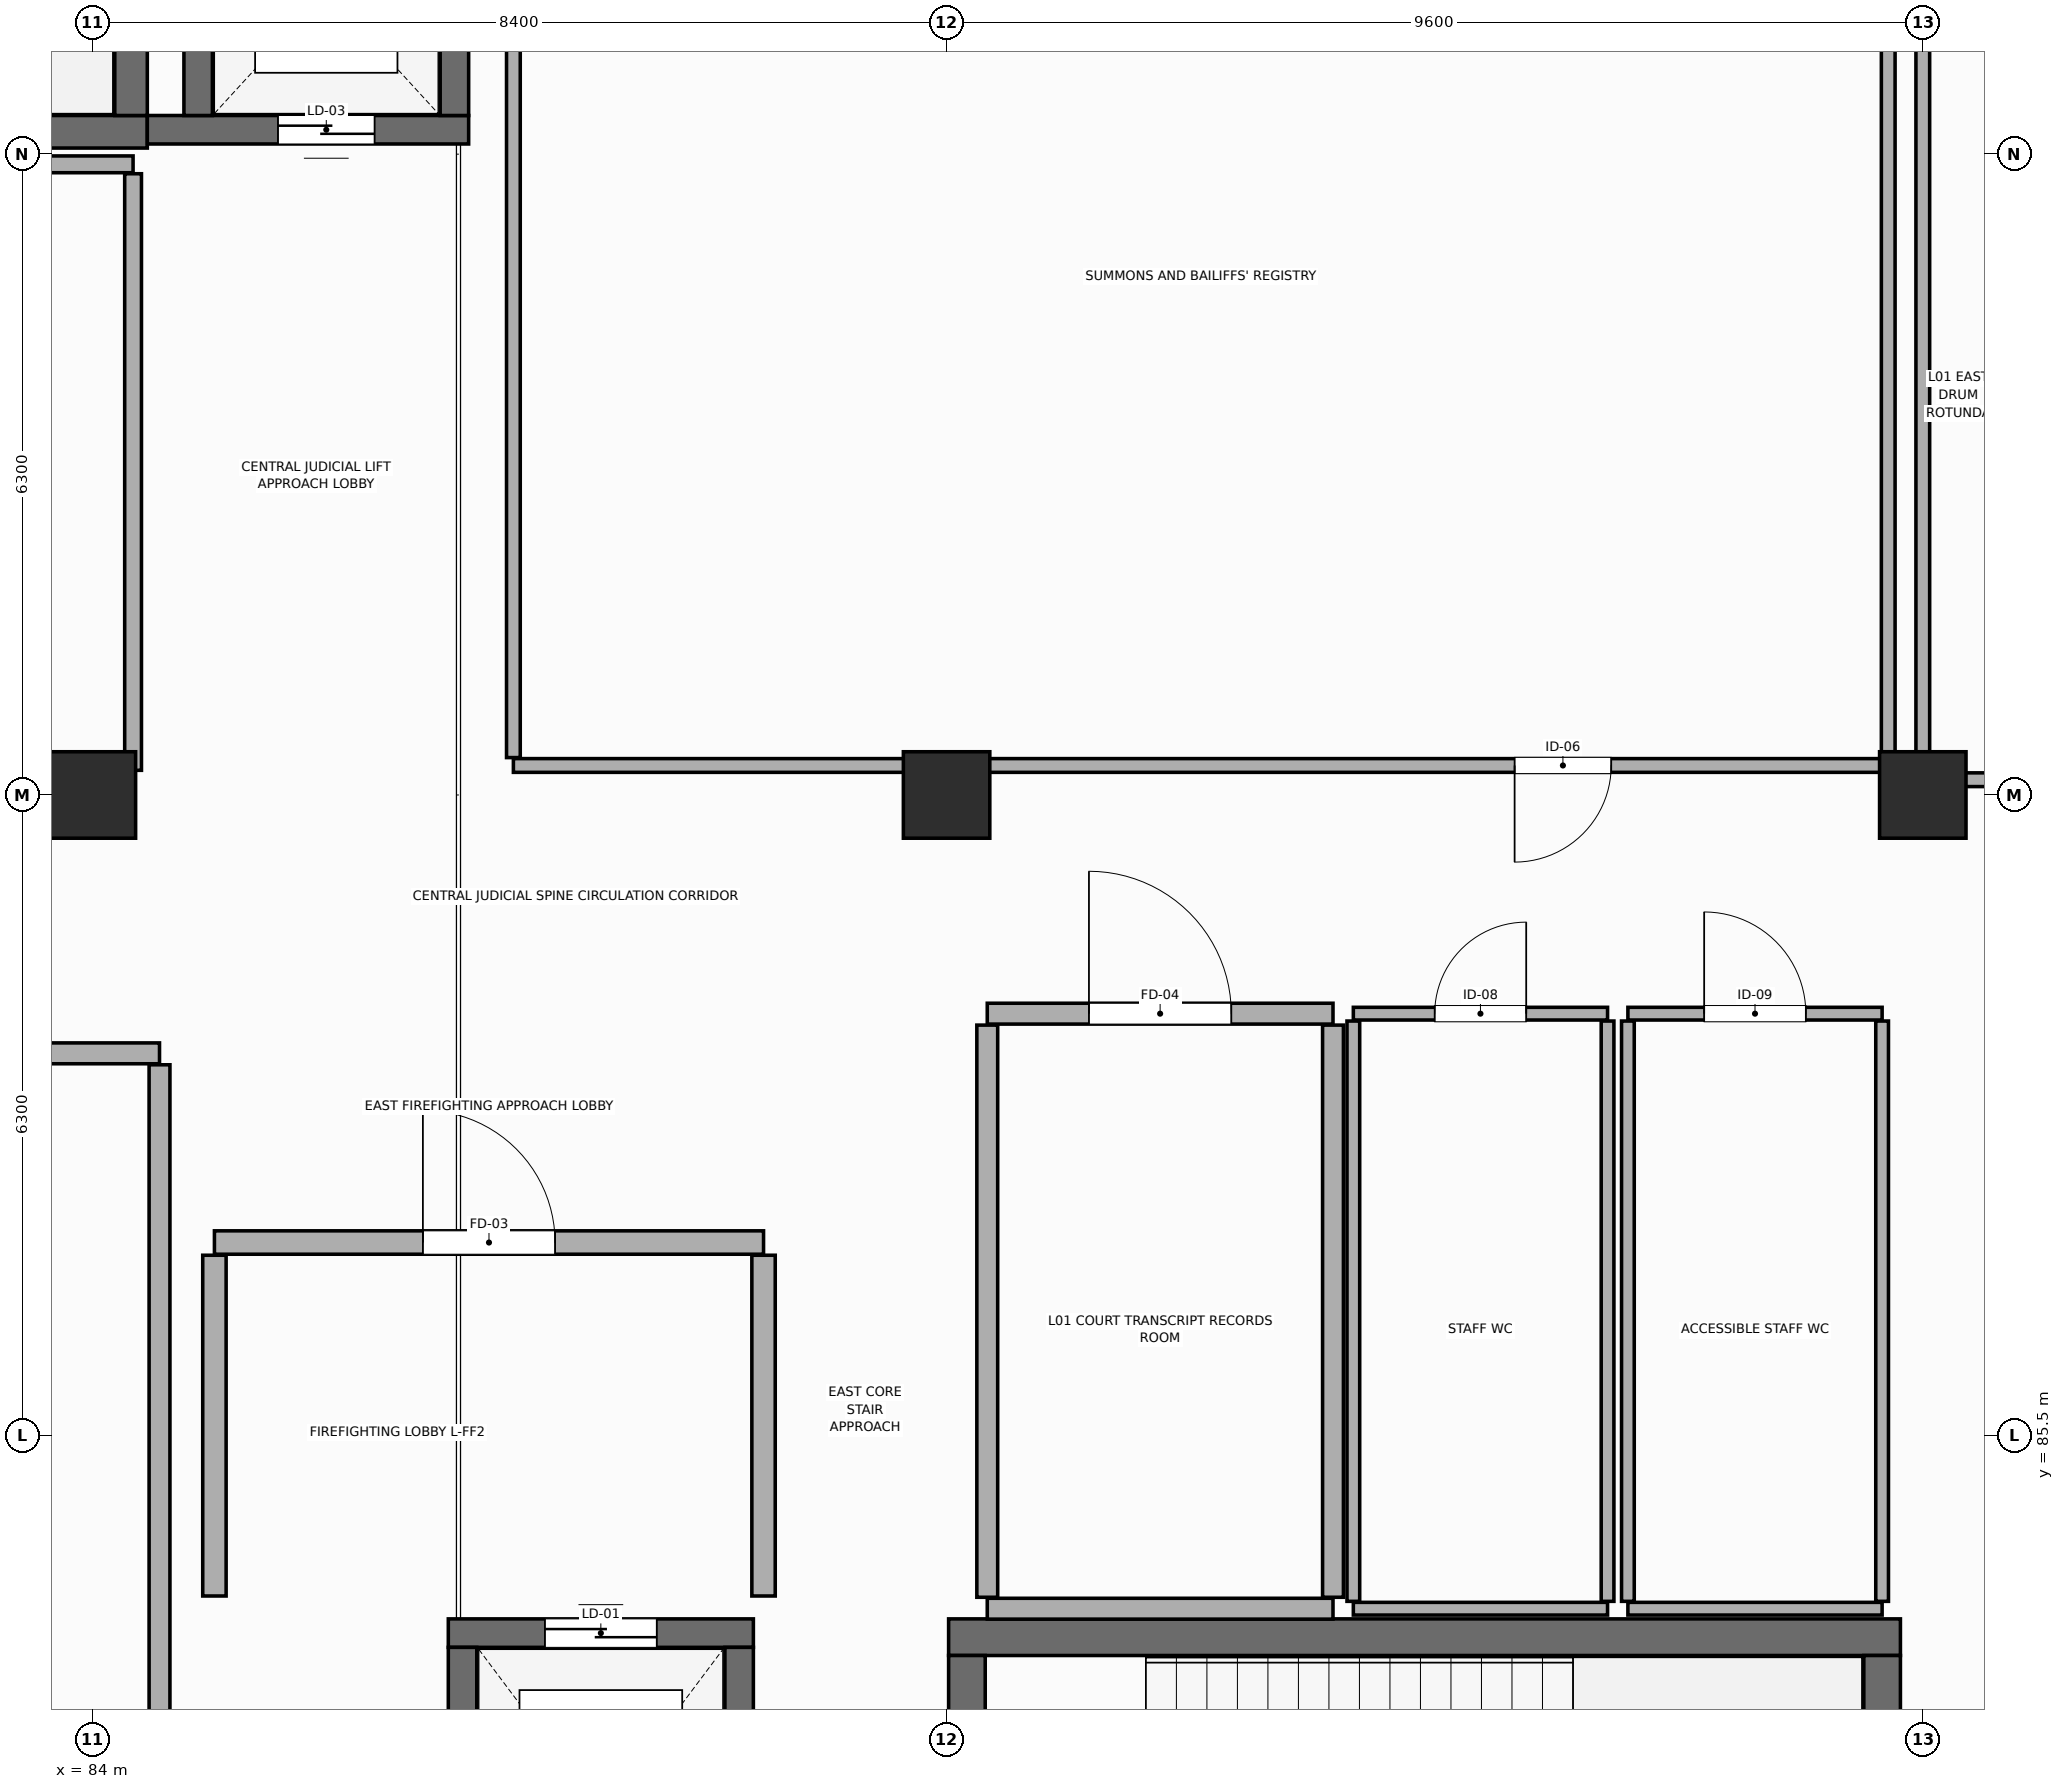
"""IFC4 building model, lengths in metres.
Left out: names, types, materials, properties, quantities, classifications, styles, units other than length and angle.
Written with IfcOpenShell. Run it as: python <this file> out.ifc"""

import sys

from ifc_helpers import new_model, si_unit, direction, frame, frame_2d, origin, origin_2d, place, context, subcontext, project, spatial, rectangle, extrude, element, fill, save


model = new_model("IFC4")
c1 = context("Model", 3, precision=1e-05, world=origin(), true_north=direction((0.0, 1.0)))
c2 = subcontext(c1, "Body", "Model", "MODEL_VIEW")
j1 = project(units=[si_unit("LENGTHUNIT", "METRE"), si_unit("PLANEANGLEUNIT", "RADIAN")], contexts=[c1])
p1 = place(None, origin())
s1 = spatial("IfcSite", under=j1, at=p1, CompositionType="ELEMENT")
p2 = place(p1, origin())
s2 = spatial("IfcBuilding", under=s1, at=p2, CompositionType="ELEMENT")
p3 = place(p2, frame((0.0, 0.0, -4.8)))
s3 = spatial("IfcBuildingStorey", under=s2, at=p3, CompositionType="ELEMENT", Elevation=-4.8)
for number, where, z_axis, x_axis in (
    (1, (84.0, 91.8, -0.42), (0.0, 0.0, 1.0), (1.0, 0.0, 0.0)),
    (2, (92.4, 91.8, -0.42), (0.0, 0.0, 1.0), (1.0, 0.0, 0.0)),
    (3, (102.0, 91.8, -0.42), (0.0, 0.0, 1.0), (1.0, 0.0, 0.0)),
):
    element("IfcColumn", number, at=place(p3, frame(where, z_axis=z_axis, x_axis=x_axis)), inside=s3, PredefinedType="COLUMN", context=c2, shape_type="SweptSolid", body=[
        extrude(rectangle(XDim=0.9, YDim=0.9, at=origin_2d()), origin(), (0.0, 0.0, 1.0), 5.22),
    ])
p4 = place(p3, frame((92.42, 83.52, -0.42), z_axis=(0.0, 0.0, 1.0), x_axis=(1.0, 0.0, 0.0)))
e4 = element("IfcWall", 4, at=p4, inside=s3, PredefinedType="SHEAR", context=c2, shape_type="SweptSolid", body=[
    extrude(rectangle(XDim=9.36, YDim=0.36, at=frame_2d((4.68, 0.0))), origin(), (0.0, 0.0, 1.0), 4.94),
])
p5 = place(p3, frame((92.6, 79.98, -0.42), z_axis=(0.0, 0.0, 1.0), x_axis=(0.0, 1.0, 0.0)))
e5 = element("IfcWall", 5, at=p5, inside=s3, PredefinedType="SHEAR", context=c2, shape_type="SweptSolid", body=[
    extrude(rectangle(XDim=3.36, YDim=0.36, at=frame_2d((1.68, 0.0))), origin(), (0.0, 0.0, 1.0), 4.94),
])
p6 = place(p5, frame((1.08, 0.0, 0.42)))
e6 = element("IfcOpeningElement", 6, at=p6, cuts=e5, PredefinedType="OPENING", context=c2, shape_type="SweptSolid", body=[
    extrude(rectangle(XDim=1.2, YDim=2.2, at=frame_2d((0.6, 1.1))), frame((0.0, 0.19, 0.0), z_axis=(0.0, -1.0, 0.0), x_axis=(1.0, 0.0, 0.0)), (0.0, 0.0, 1.0), 0.38),
])
p7 = place(p3, frame((101.6, 83.34, -0.42), z_axis=(0.0, 0.0, 1.0), x_axis=(0.0, -1.0, 0.0)))
e7 = element("IfcWall", 7, at=p7, inside=s3, PredefinedType="SHEAR", context=c2, shape_type="SweptSolid", body=[
    extrude(rectangle(XDim=3.36, YDim=0.36, at=frame_2d((1.68, 0.0))), origin(), (0.0, 0.0, 1.0), 4.94),
])
p8 = place(p3, frame((84.54, 98.32, -0.42), z_axis=(0.0, 0.0, 1.0), x_axis=(-1.0, 0.0, 0.0)))
e8 = element("IfcWall", 8, at=p8, inside=s3, PredefinedType="SHEAR", context=c2, shape_type="SweptSolid", body=[
    extrude(rectangle(XDim=9.08, YDim=0.32, at=frame_2d((4.54, 0.0))), origin(), (0.0, 0.0, 1.0), 4.94),
])
p9 = place(p3, frame((84.38, 101.76, -0.42), z_axis=(0.0, 0.0, 1.0), x_axis=(0.0, -1.0, 0.0)))
e9 = element("IfcWall", 9, at=p9, inside=s3, PredefinedType="SHEAR", context=c2, shape_type="SweptSolid", body=[
    extrude(rectangle(XDim=3.28, YDim=0.32, at=frame_2d((1.64, 0.0))), origin(), (0.0, 0.0, 1.0), 4.94),
])
p10 = place(p3, frame((87.5, 83.56, -0.42), z_axis=(0.0, 0.0, 1.0), x_axis=(1.0, 0.0, 0.0)))
e10 = element("IfcWall", 10, at=p10, inside=s3, PredefinedType="SHEAR", context=c2, shape_type="SweptSolid", body=[
    extrude(rectangle(XDim=3.0, YDim=0.28, at=frame_2d((1.5, 0.0))), origin(), (0.0, 0.0, 1.0), 4.94),
])
p11 = place(p10, frame((0.95, 0.0, 0.42)))
e11 = element("IfcOpeningElement", 11, at=p11, cuts=e10, PredefinedType="OPENING", context=c2, shape_type="SweptSolid", body=[
    extrude(rectangle(XDim=1.1, YDim=2.2, at=frame_2d((0.55, 1.1))), frame((0.0, 0.15, 0.0), z_axis=(0.0, -1.0, 0.0), x_axis=(1.0, 0.0, 0.0)), (0.0, 0.0, 1.0), 0.3),
])
for number, where, z_axis, x_axis in (
    (12, (87.64, 80.18, -0.42), (0.0, 0.0, 1.0), (0.0, 1.0, 0.0)),
    (13, (90.36, 83.42, -0.42), (0.0, 0.0, 1.0), (0.0, -1.0, 0.0)),
):
    element("IfcWall", number, at=place(p3, frame(where, z_axis=z_axis, x_axis=x_axis)), inside=s3, PredefinedType="SHEAR", context=c2, shape_type="SweptSolid", body=[
        extrude(rectangle(XDim=3.24, YDim=0.28, at=frame_2d((1.62, 0.0))), origin(), (0.0, 0.0, 1.0), 4.94),
    ])
p12 = place(p3, frame((87.7, 98.34, -0.42), z_axis=(0.0, 0.0, 1.0), x_axis=(-1.0, 0.0, 0.0)))
e14 = element("IfcWall", 14, at=p12, inside=s3, PredefinedType="SHEAR", context=c2, shape_type="SweptSolid", body=[
    extrude(rectangle(XDim=3.16, YDim=0.28, at=frame_2d((1.58, 0.0))), origin(), (0.0, 0.0, 1.0), 4.94),
])
p13 = place(p12, frame((0.925, 0.0, 0.42)))
e15 = element("IfcOpeningElement", 15, at=p13, cuts=e14, PredefinedType="OPENING", context=c2, shape_type="SweptSolid", body=[
    extrude(rectangle(XDim=0.95, YDim=2.15, at=frame_2d((0.475, 1.075))), frame((0.0, 0.15, 0.0), z_axis=(0.0, -1.0, 0.0), x_axis=(1.0, 0.0, 0.0)), (0.0, 0.0, 1.0), 0.3),
])
for number, where, z_axis, x_axis in (
    (16, (85.04, 98.48, -0.42), (0.0, 0.0, 1.0), (0.0, 1.0, 0.0)),
    (17, (87.56, 100.92, -0.42), (0.0, 0.0, 1.0), (0.0, -1.0, 0.0)),
):
    element("IfcWall", number, at=place(p3, frame(where, z_axis=z_axis, x_axis=x_axis)), inside=s3, PredefinedType="SHEAR", context=c2, shape_type="SweptSolid", body=[
        extrude(rectangle(XDim=2.44, YDim=0.28, at=frame_2d((1.22, 0.0))), origin(), (0.0, 0.0, 1.0), 4.94),
    ])
p14 = place(p3, frame((85.2, 87.4, 0.0), z_axis=(0.0, 0.0, 1.0), x_axis=(1.0, 0.0, 0.0)))
e18 = element("IfcWall", 18, at=p14, inside=s3, PredefinedType="STANDARD", context=c2, shape_type="SweptSolid", body=[
    extrude(rectangle(XDim=5.4, YDim=0.23, at=frame_2d((2.7, 0.0))), origin(), (0.0, 0.0, 1.0), 3.9),
])
p15 = place(p14, frame((2.05, 0.0, 0.0)))
e19 = element("IfcOpeningElement", 19, at=p15, cuts=e18, PredefinedType="OPENING", context=c2, shape_type="SweptSolid", body=[
    extrude(rectangle(XDim=1.3, YDim=2.2, at=frame_2d((0.65, 1.1))), frame((0.0, 0.125, 0.0), z_axis=(0.0, -1.0, 0.0), x_axis=(1.0, 0.0, 0.0)), (0.0, 0.0, 1.0), 0.25),
])
for number, where, z_axis, x_axis in (
    (20, (85.2, 83.925, 0.0), (0.0, 0.0, 1.0), (0.0, 1.0, 0.0)),
    (21, (90.6, 87.275, 0.0), (0.0, 0.0, 1.0), (0.0, -1.0, 0.0)),
):
    element("IfcWall", number, at=place(p3, frame(where, z_axis=z_axis, x_axis=x_axis)), inside=s3, PredefinedType="STANDARD", context=c2, shape_type="SweptSolid", body=[
        extrude(rectangle(XDim=3.35, YDim=0.23, at=frame_2d((1.675, 0.0))), origin(), (0.0, 0.0, 1.0), 3.9),
    ])
p16 = place(p3, frame((96.4, 89.65, 0.0), z_axis=(0.0, 0.0, 1.0), x_axis=(1.0, 0.0, 0.0)))
e22 = element("IfcWall", 22, at=p16, inside=s3, PredefinedType="PARTITIONING", context=c2, shape_type="SweptSolid", body=[
    extrude(rectangle(XDim=2.5, YDim=0.125, at=frame_2d((1.25, 0.0))), origin(), (0.0, 0.0, 1.0), 4.505),
])
p17 = place(p16, frame((0.8, 0.0, 0.0)))
e23 = element("IfcOpeningElement", 23, at=p17, cuts=e22, PredefinedType="OPENING", context=c2, shape_type="SweptSolid", body=[
    extrude(rectangle(XDim=0.9, YDim=2.1, at=frame_2d((0.45, 1.05))), frame((0.0, 0.073, 0.0), z_axis=(0.0, -1.0, 0.0), x_axis=(1.0, 0.0, 0.0)), (0.0, 0.0, 1.0), 0.145),
])
p18 = place(p3, frame((98.9, 83.8, 0.0), z_axis=(0.0, 0.0, 1.0), x_axis=(-1.0, 0.0, 0.0)))
e24 = element("IfcWall", 24, at=p18, inside=s3, PredefinedType="PARTITIONING", context=c2, shape_type="SweptSolid", body=[
    extrude(rectangle(XDim=2.5, YDim=0.125, at=frame_2d((1.25, 0.0))), origin(), (0.0, 0.0, 1.0), 4.505),
])
for number, where, z_axis, x_axis in (
    (25, (96.4, 83.873, 0.0), (0.0, 0.0, 1.0), (0.0, 1.0, 0.0)),
    (26, (98.9, 89.577, 0.0), (0.0, 0.0, 1.0), (0.0, -1.0, 0.0)),
):
    element("IfcWall", number, at=place(p3, frame(where, z_axis=z_axis, x_axis=x_axis)), inside=s3, PredefinedType="PARTITIONING", context=c2, shape_type="SweptSolid", body=[
        extrude(rectangle(XDim=5.705, YDim=0.125, at=frame_2d((2.853, 0.0))), origin(), (0.0, 0.0, 1.0), 3.9),
    ])
p19 = place(p3, frame((99.1, 89.65, 0.0), z_axis=(0.0, 0.0, 1.0), x_axis=(1.0, 0.0, 0.0)))
e27 = element("IfcWall", 27, at=p19, inside=s3, PredefinedType="PARTITIONING", context=c2, shape_type="SweptSolid", body=[
    extrude(rectangle(XDim=2.5, YDim=0.125, at=frame_2d((1.25, 0.0))), origin(), (0.0, 0.0, 1.0), 3.65),
])
p20 = place(p19, frame((0.75, 0.0, 0.0)))
e28 = element("IfcOpeningElement", 28, at=p20, cuts=e27, PredefinedType="OPENING", context=c2, shape_type="SweptSolid", body=[
    extrude(rectangle(XDim=1.0, YDim=2.1, at=frame_2d((0.5, 1.05))), frame((0.0, 0.073, 0.0), z_axis=(0.0, -1.0, 0.0), x_axis=(1.0, 0.0, 0.0)), (0.0, 0.0, 1.0), 0.145),
])
p21 = place(p3, frame((101.6, 83.8, 0.0), z_axis=(0.0, 0.0, 1.0), x_axis=(-1.0, 0.0, 0.0)))
e29 = element("IfcWall", 29, at=p21, inside=s3, PredefinedType="PARTITIONING", context=c2, shape_type="SweptSolid", body=[
    extrude(rectangle(XDim=2.5, YDim=0.125, at=frame_2d((1.25, 0.0))), origin(), (0.0, 0.0, 1.0), 3.65),
])
p22 = place(p3, frame((99.1, 83.873, 0.0), z_axis=(0.0, 0.0, 1.0), x_axis=(0.0, 1.0, 0.0)))
e30 = element("IfcWall", 30, at=p22, inside=s3, PredefinedType="PARTITIONING", context=c2, shape_type="SweptSolid", body=[
    extrude(rectangle(XDim=5.705, YDim=0.125, at=frame_2d((2.853, 0.0))), origin(), (0.0, 0.0, 1.0), 3.9),
])
p23 = place(p3, frame((101.6, 89.577, 0.0), z_axis=(0.0, 0.0, 1.0), x_axis=(0.0, -1.0, 0.0)))
e31 = element("IfcWall", 31, at=p23, inside=s3, PredefinedType="PARTITIONING", context=c2, shape_type="SweptSolid", body=[
    extrude(rectangle(XDim=5.705, YDim=0.125, at=frame_2d((2.853, 0.0))), origin(), (0.0, 0.0, 1.0), 3.65),
])
p24 = place(p3, frame((92.8, 89.65, 0.0), z_axis=(0.0, 0.0, 1.0), x_axis=(1.0, 0.0, 0.0)))
e32 = element("IfcWall", 32, at=p24, inside=s3, PredefinedType="STANDARD", context=c2, shape_type="SweptSolid", body=[
    extrude(rectangle(XDim=3.4, YDim=0.205, at=frame_2d((1.7, 0.0))), origin(), (0.0, 0.0, 1.0), 3.65),
])
p25 = place(p24, frame((1.0, 0.0, 0.0)))
e33 = element("IfcOpeningElement", 33, at=p25, cuts=e32, PredefinedType="OPENING", context=c2, shape_type="SweptSolid", body=[
    extrude(rectangle(XDim=1.4, YDim=2.25, at=frame_2d((0.7, 1.125))), frame((0.0, 0.113, 0.0), z_axis=(0.0, -1.0, 0.0), x_axis=(1.0, 0.0, 0.0)), (0.0, 0.0, 1.0), 0.225),
])
p26 = place(p3, frame((96.2, 83.8, 0.0), z_axis=(0.0, 0.0, 1.0), x_axis=(-1.0, 0.0, 0.0)))
e34 = element("IfcWall", 34, at=p26, inside=s3, PredefinedType="STANDARD", context=c2, shape_type="SweptSolid", body=[
    extrude(rectangle(XDim=3.4, YDim=0.205, at=frame_2d((1.7, 0.0))), origin(), (0.0, 0.0, 1.0), 3.65),
])
p27 = place(p3, frame((92.8, 83.913, 0.0), z_axis=(0.0, 0.0, 1.0), x_axis=(0.0, 1.0, 0.0)))
e35 = element("IfcWall", 35, at=p27, inside=s3, PredefinedType="STANDARD", context=c2, shape_type="SweptSolid", body=[
    extrude(rectangle(XDim=5.625, YDim=0.205, at=frame_2d((2.812, 0.0))), origin(), (0.0, 0.0, 1.0), 3.65),
])
p28 = place(p3, frame((96.2, 89.538, 0.0), z_axis=(0.0, 0.0, 1.0), x_axis=(0.0, -1.0, 0.0)))
e36 = element("IfcWall", 36, at=p28, inside=s3, PredefinedType="STANDARD", context=c2, shape_type="SweptSolid", body=[
    extrude(rectangle(XDim=5.625, YDim=0.205, at=frame_2d((2.812, 0.0))), origin(), (0.0, 0.0, 1.0), 3.9),
])
p29 = place(p11, origin())
e37 = element("IfcDoor", 37, at=p29, inside=s3, OperationType="DOUBLE_DOOR_SLIDING", PredefinedType="DOOR", context=c2, shape_type="SweptSolid", body=[
    extrude(rectangle(XDim=1.1, YDim=2.2, at=frame_2d((0.55, 1.1))), frame((0.0, 0.025, 0.0), z_axis=(0.0, -1.0, 0.0), x_axis=(1.0, 0.0, 0.0)), (0.0, 0.0, 1.0), 0.05),
])
fill(e11, e37)
p30 = place(p13, origin())
e38 = element("IfcDoor", 38, at=p30, inside=s3, OperationType="DOUBLE_DOOR_SLIDING", PredefinedType="DOOR", context=c2, shape_type="SweptSolid", body=[
    extrude(rectangle(XDim=0.95, YDim=2.15, at=frame_2d((0.475, 1.075))), frame((0.0, 0.025, 0.0), z_axis=(0.0, -1.0, 0.0), x_axis=(1.0, 0.0, 0.0)), (0.0, 0.0, 1.0), 0.05),
])
fill(e15, e38)
p31 = place(p15, origin())
e39 = element("IfcDoor", 39, at=p31, inside=s3, OperationType="SINGLE_SWING_RIGHT", PredefinedType="DOOR", context=c2, shape_type="SweptSolid", body=[
    extrude(rectangle(XDim=1.3, YDim=2.2, at=frame_2d((0.65, 1.1))), frame((0.0, 0.025, 0.0), z_axis=(0.0, -1.0, 0.0), x_axis=(1.0, 0.0, 0.0)), (0.0, 0.0, 1.0), 0.05),
])
fill(e19, e39)
p32 = place(p17, origin())
e40 = element("IfcDoor", 40, at=p32, inside=s3, OperationType="SINGLE_SWING_LEFT", PredefinedType="DOOR", context=c2, shape_type="SweptSolid", body=[
    extrude(rectangle(XDim=0.9, YDim=2.1, at=frame_2d((0.45, 1.05))), frame((0.0, 0.025, 0.0), z_axis=(0.0, -1.0, 0.0), x_axis=(1.0, 0.0, 0.0)), (0.0, 0.0, 1.0), 0.05),
])
fill(e23, e40)
p33 = place(p20, origin())
e41 = element("IfcDoor", 41, at=p33, inside=s3, OperationType="SINGLE_SWING_RIGHT", PredefinedType="DOOR", context=c2, shape_type="SweptSolid", body=[
    extrude(rectangle(XDim=1.0, YDim=2.1, at=frame_2d((0.5, 1.05))), frame((0.0, 0.025, 0.0), z_axis=(0.0, -1.0, 0.0), x_axis=(1.0, 0.0, 0.0)), (0.0, 0.0, 1.0), 0.05),
])
fill(e28, e41)
p34 = place(p25, origin())
e42 = element("IfcDoor", 42, at=p34, inside=s3, OperationType="SINGLE_SWING_RIGHT", PredefinedType="DOOR", context=c2, shape_type="SweptSolid", body=[
    extrude(rectangle(XDim=1.4, YDim=2.25, at=frame_2d((0.7, 1.125))), frame((0.0, 0.025, 0.0), z_axis=(0.0, -1.0, 0.0), x_axis=(1.0, 0.0, 0.0)), (0.0, 0.0, 1.0), 0.05),
])
fill(e33, e42)
save(model, sys.argv[1])
